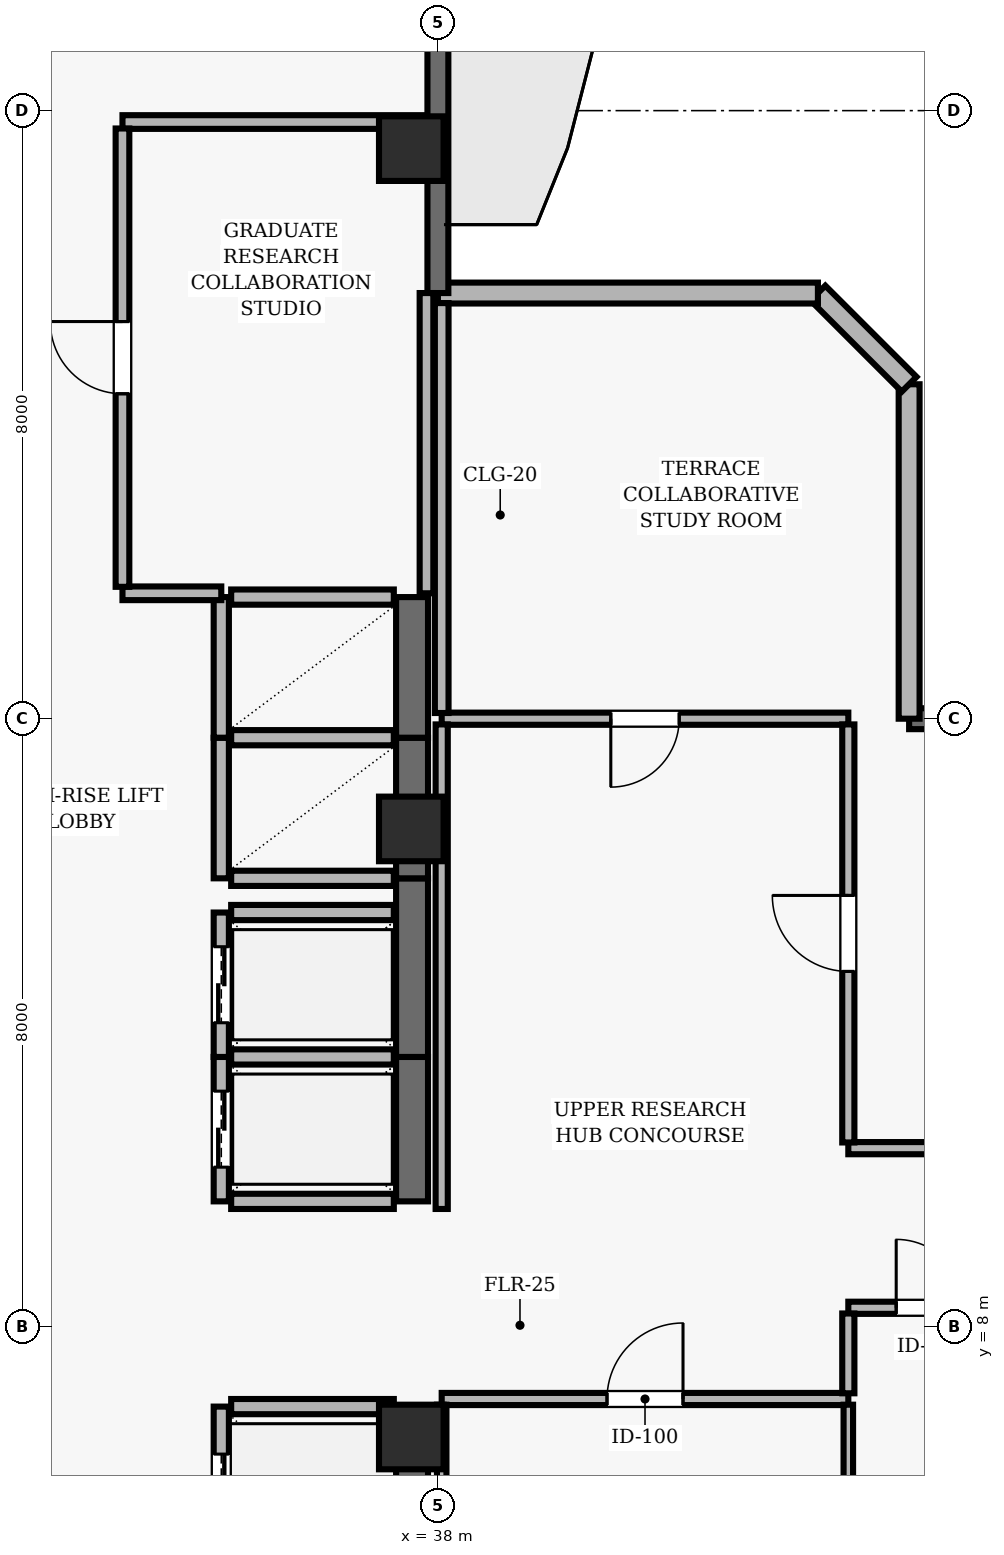
"""IFC4 building model, lengths in metres.
Left out: names, types, materials, properties, quantities, classifications, styles, units other than length and angle.
Written with IfcOpenShell. Run it as: python <this file> out.ifc"""

import sys

from ifc_helpers import new_model, si_unit, direction, frame, frame_2d, origin, origin_2d, place, context, subcontext, project, spatial, rectangle, extrude, element, fill, save


model = new_model("IFC4")
c1 = context("Model", 3, precision=1e-05, world=origin(), true_north=direction((0.0, 1.0)))
c2 = subcontext(c1, "Body", "Model", "MODEL_VIEW")
j1 = project(units=[si_unit("LENGTHUNIT", "METRE"), si_unit("PLANEANGLEUNIT", "RADIAN")], contexts=[c1])
p1 = place(None, origin())
s1 = spatial("IfcSite", under=j1, at=p1, CompositionType="ELEMENT")
p2 = place(p1, origin())
s2 = spatial("IfcBuilding", under=s1, at=p2, CompositionType="ELEMENT")
p3 = place(p2, frame((0.0, 0.0, 302.8)))
s3 = spatial("IfcBuildingStorey", under=s2, at=p3, CompositionType="ELEMENT", Elevation=302.8)
for number, where, z_axis, x_axis in (
    (1, (37.65, 6.55, 0.0), (0.0, 0.0, 1.0), (1.0, 0.0, 0.0)),
    (2, (37.65, 14.55, 0.0), (0.0, 0.0, 1.0), (1.0, 0.0, 0.0)),
    (3, (37.65, 23.5, 0.0), (0.0, 0.0, 1.0), (1.0, 0.0, 0.0)),
):
    element("IfcColumn", number, at=place(p3, frame(where, z_axis=z_axis, x_axis=x_axis)), inside=s3, PredefinedType="COLUMN", context=c2, shape_type="SweptSolid", body=[
        extrude(rectangle(XDim=0.85, YDim=0.85, at=origin_2d()), origin(), (0.0, 0.0, 1.0), 3.9),
    ])
p4 = place(p3, frame((57.3, 16.0, 0.0), z_axis=(0.0, 0.0, 1.0), x_axis=(-1.0, 0.0, 0.0)))
e4 = element("IfcWall", 4, at=p4, inside=s3, PredefinedType="SOLIDWALL", context=c2, shape_type="SweptSolid", body=[
    extrude(rectangle(XDim=13.1, YDim=0.275, at=frame_2d((6.55, 0.0))), origin(), (0.0, 0.0, 1.0), 3.64),
])
p5 = place(p4, frame((7.05, 0.0, 0.0)))
e5 = element("IfcOpeningElement", 5, at=p5, cuts=e4, PredefinedType="OPENING", context=c2, shape_type="SweptSolid", body=[
    extrude(rectangle(XDim=1.0, YDim=2.2, at=frame_2d((0.5, 1.1))), frame((0.0, 0.147, 0.0), z_axis=(0.0, -1.0, 0.0), x_axis=(1.0, 0.0, 0.0)), (0.0, 0.0, 1.0), 0.295),
])
p6 = place(p4, frame((2.375, 0.0, 0.9)))
e6 = element("IfcOpeningElement", 6, at=p6, cuts=e4, PredefinedType="OPENING", context=c2, shape_type="SweptSolid", body=[
    extrude(rectangle(XDim=1.8, YDim=1.8, at=frame_2d((0.9, 0.9))), frame((0.0, 0.147, 0.0), z_axis=(0.0, -1.0, 0.0), x_axis=(1.0, 0.0, 0.0)), (0.0, 0.0, 1.0), 0.295),
])
p7 = place(p3, frame((44.2, 16.0, 0.0), z_axis=(0.0, 0.0, 1.0), x_axis=(0.0, 1.0, 0.0)))
e7 = element("IfcWall", 7, at=p7, inside=s3, PredefinedType="SOLIDWALL", context=c2, shape_type="SweptSolid", body=[
    extrude(rectangle(XDim=4.4, YDim=0.275, at=frame_2d((2.2, 0.0))), origin(), (0.0, 0.0, 1.0), 3.64),
])
p8 = place(p3, frame((44.2, 20.4, 0.0), z_axis=(0.0, 0.0, 1.0), x_axis=(-0.707034851297, 0.707178703759, 0.0)))
e8 = element("IfcWall", 8, at=p8, inside=s3, PredefinedType="SOLIDWALL", context=c2, shape_type="SweptSolid", body=[
    extrude(rectangle(XDim=1.697, YDim=0.275, at=frame_2d((0.849, 0.0))), origin(), (0.0, 0.0, 1.0), 3.64),
])
p9 = place(p3, frame((43.0, 21.6, 0.0), z_axis=(0.0, 0.0, 1.0), x_axis=(-1.0, 0.0, 0.0)))
e9 = element("IfcWall", 9, at=p9, inside=s3, PredefinedType="SOLIDWALL", context=c2, shape_type="SweptSolid", body=[
    extrude(rectangle(XDim=5.0, YDim=0.275, at=frame_2d((2.5, 0.0))), origin(), (0.0, 0.0, 1.0), 3.64),
])
p10 = place(p3, frame((38.0, 21.6, 0.0), z_axis=(0.0, 0.0, 1.0), x_axis=(0.0, 1.0, 0.0)))
e10 = element("IfcWall", 10, at=p10, inside=s3, PredefinedType="SOLIDWALL", context=c2, shape_type="SweptSolid", body=[
    extrude(rectangle(XDim=13.7, YDim=0.275, at=frame_2d((6.85, 0.0))), origin(), (0.0, 0.0, 1.0), 3.64),
])
p11 = place(p10, frame((5.35, 0.0, 0.0)))
e11 = element("IfcOpeningElement", 11, at=p11, cuts=e10, PredefinedType="OPENING", context=c2, shape_type="SweptSolid", body=[
    extrude(rectangle(XDim=1.0, YDim=2.2, at=frame_2d((0.5, 1.1))), frame((0.0, 0.147, 0.0), z_axis=(0.0, -1.0, 0.0), x_axis=(1.0, 0.0, 0.0)), (0.0, 0.0, 1.0), 0.295),
])
p12 = place(p10, frame((9.075, 0.0, 0.9)))
e12 = element("IfcOpeningElement", 12, at=p12, cuts=e10, PredefinedType="OPENING", context=c2, shape_type="SweptSolid", body=[
    extrude(rectangle(XDim=2.4, YDim=2.2, at=frame_2d((1.2, 1.1))), frame((0.0, 0.147, 0.0), z_axis=(0.0, -1.0, 0.0), x_axis=(1.0, 0.0, 0.0)), (0.0, 0.0, 1.0), 0.295),
])
p13 = place(p3, frame((35.15, 6.95, 0.0), z_axis=(0.0, 0.0, 1.0), x_axis=(0.0, -1.0, 0.0)))
e13 = element("IfcWall", 13, at=p13, inside=s3, PredefinedType="SOLIDWALL", context=c2, shape_type="SweptSolid", body=[
    extrude(rectangle(XDim=2.25, YDim=0.2, at=frame_2d((1.125, 0.0))), origin(), (0.0, 0.0, 1.0), 3.64),
])
p14 = place(p13, frame((0.625, 0.0, 0.0)))
e14 = element("IfcOpeningElement", 14, at=p14, cuts=e13, PredefinedType="OPENING", context=c2, shape_type="SweptSolid", body=[
    extrude(rectangle(XDim=1.0, YDim=2.1, at=frame_2d((0.5, 1.05))), frame((0.0, 0.11, 0.0), z_axis=(0.0, -1.0, 0.0), x_axis=(1.0, 0.0, 0.0)), (0.0, 0.0, 1.0), 0.22),
])
p15 = place(p3, frame((37.66, 4.7, 0.0), z_axis=(0.0, 0.0, 1.0), x_axis=(0.0, 1.0, 0.0)))
e15 = element("IfcWall", 15, at=p15, inside=s3, PredefinedType="SHEAR", context=c2, shape_type="SweptSolid", body=[
    extrude(rectangle(XDim=2.25, YDim=0.42, at=frame_2d((1.125, 0.0))), origin(), (0.0, 0.0, 1.0), 3.64),
])
p16 = place(p3, frame((37.42, 6.95, 0.0), z_axis=(0.0, 0.0, 1.0), x_axis=(-1.0, 0.0, 0.0)))
e16 = element("IfcWall", 16, at=p16, inside=s3, PredefinedType="SOLIDWALL", context=c2, shape_type="SweptSolid", body=[
    extrude(rectangle(XDim=2.14, YDim=0.2, at=frame_2d((1.07, 0.0))), origin(), (0.0, 0.0, 1.0), 3.64),
])
p17 = place(p3, frame((35.15, 11.55, 0.0), z_axis=(0.0, 0.0, 1.0), x_axis=(0.0, -1.0, 0.0)))
e17 = element("IfcWall", 17, at=p17, inside=s3, PredefinedType="SOLIDWALL", context=c2, shape_type="SweptSolid", body=[
    extrude(rectangle(XDim=1.9, YDim=0.2, at=frame_2d((0.95, 0.0))), origin(), (0.0, 0.0, 1.0), 3.64),
])
p18 = place(p17, frame((0.45, 0.0, 0.0)))
e18 = element("IfcOpeningElement", 18, at=p18, cuts=e17, PredefinedType="OPENING", context=c2, shape_type="SweptSolid", body=[
    extrude(rectangle(XDim=1.0, YDim=2.1, at=frame_2d((0.5, 1.05))), frame((0.0, 0.11, 0.0), z_axis=(0.0, -1.0, 0.0), x_axis=(1.0, 0.0, 0.0)), (0.0, 0.0, 1.0), 0.22),
])
p19 = place(p3, frame((37.66, 9.65, 0.0), z_axis=(0.0, 0.0, 1.0), x_axis=(0.0, 1.0, 0.0)))
e19 = element("IfcWall", 19, at=p19, inside=s3, PredefinedType="SHEAR", context=c2, shape_type="SweptSolid", body=[
    extrude(rectangle(XDim=1.9, YDim=0.42, at=frame_2d((0.95, 0.0))), origin(), (0.0, 0.0, 1.0), 3.64),
])
for number, where, z_axis, x_axis in (
    (20, (35.28, 9.65, 0.0), (0.0, 0.0, 1.0), (1.0, 0.0, 0.0)),
    (21, (37.42, 11.55, 0.0), (0.0, 0.0, 1.0), (-1.0, 0.0, 0.0)),
):
    element("IfcWall", number, at=place(p3, frame(where, z_axis=z_axis, x_axis=x_axis)), inside=s3, PredefinedType="SOLIDWALL", context=c2, shape_type="SweptSolid", body=[
        extrude(rectangle(XDim=2.14, YDim=0.2, at=frame_2d((1.07, 0.0))), origin(), (0.0, 0.0, 1.0), 3.64),
    ])
p20 = place(p3, frame((35.15, 13.45, 0.0), z_axis=(0.0, 0.0, 1.0), x_axis=(0.0, -1.0, 0.0)))
e22 = element("IfcWall", 22, at=p20, inside=s3, PredefinedType="SOLIDWALL", context=c2, shape_type="SweptSolid", body=[
    extrude(rectangle(XDim=1.9, YDim=0.2, at=frame_2d((0.95, 0.0))), origin(), (0.0, 0.0, 1.0), 3.64),
])
p21 = place(p20, frame((0.45, 0.0, 0.0)))
e23 = element("IfcOpeningElement", 23, at=p21, cuts=e22, PredefinedType="OPENING", context=c2, shape_type="SweptSolid", body=[
    extrude(rectangle(XDim=1.0, YDim=2.1, at=frame_2d((0.5, 1.05))), frame((0.0, 0.11, 0.0), z_axis=(0.0, -1.0, 0.0), x_axis=(1.0, 0.0, 0.0)), (0.0, 0.0, 1.0), 0.22),
])
p22 = place(p3, frame((37.66, 11.55, 0.0), z_axis=(0.0, 0.0, 1.0), x_axis=(0.0, 1.0, 0.0)))
e24 = element("IfcWall", 24, at=p22, inside=s3, PredefinedType="SHEAR", context=c2, shape_type="SweptSolid", body=[
    extrude(rectangle(XDim=2.35, YDim=0.42, at=frame_2d((1.175, 0.0))), origin(), (0.0, 0.0, 1.0), 3.64),
])
p23 = place(p3, frame((37.42, 13.45, 0.0), z_axis=(0.0, 0.0, 1.0), x_axis=(-1.0, 0.0, 0.0)))
e25 = element("IfcWall", 25, at=p23, inside=s3, PredefinedType="SOLIDWALL", context=c2, shape_type="SweptSolid", body=[
    extrude(rectangle(XDim=2.14, YDim=0.2, at=frame_2d((1.07, 0.0))), origin(), (0.0, 0.0, 1.0), 3.64),
])
p24 = place(p3, frame((35.15, 15.75, 0.0), z_axis=(0.0, 0.0, 1.0), x_axis=(0.0, -1.0, 0.0)))
e26 = element("IfcWall", 26, at=p24, inside=s3, PredefinedType="SOLIDWALL", context=c2, shape_type="SweptSolid", body=[
    extrude(rectangle(XDim=1.85, YDim=0.2, at=frame_2d((0.925, 0.0))), origin(), (0.0, 0.0, 1.0), 3.64),
])
p25 = place(p3, frame((37.66, 13.9, 0.0), z_axis=(0.0, 0.0, 1.0), x_axis=(0.0, 1.0, 0.0)))
e27 = element("IfcWall", 27, at=p25, inside=s3, PredefinedType="SHEAR", context=c2, shape_type="SweptSolid", body=[
    extrude(rectangle(XDim=1.85, YDim=0.42, at=frame_2d((0.925, 0.0))), origin(), (0.0, 0.0, 1.0), 3.64),
])
for number, where, z_axis, x_axis in (
    (28, (35.28, 13.9, 0.0), (0.0, 0.0, 1.0), (1.0, 0.0, 0.0)),
    (29, (37.42, 15.75, 0.0), (0.0, 0.0, 1.0), (-1.0, 0.0, 0.0)),
):
    element("IfcWall", number, at=place(p3, frame(where, z_axis=z_axis, x_axis=x_axis)), inside=s3, PredefinedType="SOLIDWALL", context=c2, shape_type="SweptSolid", body=[
        extrude(rectangle(XDim=2.14, YDim=0.2, at=frame_2d((1.07, 0.0))), origin(), (0.0, 0.0, 1.0), 3.64),
    ])
p26 = place(p3, frame((35.15, 17.6, 0.0), z_axis=(0.0, 0.0, 1.0), x_axis=(0.0, -1.0, 0.0)))
e30 = element("IfcWall", 30, at=p26, inside=s3, PredefinedType="SOLIDWALL", context=c2, shape_type="SweptSolid", body=[
    extrude(rectangle(XDim=1.85, YDim=0.2, at=frame_2d((0.925, 0.0))), origin(), (0.0, 0.0, 1.0), 3.64),
])
p27 = place(p3, frame((37.66, 15.75, 0.0), z_axis=(0.0, 0.0, 1.0), x_axis=(0.0, 1.0, 0.0)))
e31 = element("IfcWall", 31, at=p27, inside=s3, PredefinedType="SHEAR", context=c2, shape_type="SweptSolid", body=[
    extrude(rectangle(XDim=1.85, YDim=0.42, at=frame_2d((0.925, 0.0))), origin(), (0.0, 0.0, 1.0), 3.64),
])
p28 = place(p3, frame((37.42, 17.6, 0.0), z_axis=(0.0, 0.0, 1.0), x_axis=(-1.0, 0.0, 0.0)))
e32 = element("IfcWall", 32, at=p28, inside=s3, PredefinedType="SOLIDWALL", context=c2, shape_type="SweptSolid", body=[
    extrude(rectangle(XDim=2.14, YDim=0.2, at=frame_2d((1.07, 0.0))), origin(), (0.0, 0.0, 1.0), 3.64),
])
p29 = place(p3, frame((33.85, 17.65, 0.0), z_axis=(0.0, 0.0, 1.0), x_axis=(1.0, 0.0, 0.0)))
e33 = element("IfcWall", 33, at=p29, inside=s3, PredefinedType="PARTITIONING", context=c2, shape_type="SweptSolid", body=[
    extrude(rectangle(XDim=1.3, YDim=0.18, at=frame_2d((0.65, 0.0))), origin(), (0.0, 0.0, 1.0), 3.64),
])
p30 = place(p3, frame((37.85, 23.85, 0.0), z_axis=(0.0, 0.0, 1.0), x_axis=(-1.0, 0.0, 0.0)))
e34 = element("IfcWall", 34, at=p30, inside=s3, PredefinedType="PARTITIONING", context=c2, shape_type="SweptSolid", body=[
    extrude(rectangle(XDim=4.0, YDim=0.18, at=frame_2d((2.0, 0.0))), origin(), (0.0, 0.0, 1.0), 3.171),
])
p31 = place(p3, frame((38.05, 7.05, 0.0), z_axis=(0.0, 0.0, 1.0), x_axis=(1.0, 0.0, 0.0)))
e35 = element("IfcWall", 35, at=p31, inside=s3, PredefinedType="PARTITIONING", context=c2, shape_type="SweptSolid", body=[
    extrude(rectangle(XDim=5.35, YDim=0.16, at=frame_2d((2.675, 0.0))), origin(), (0.0, 0.0, 1.0), 3.64),
])
p32 = place(p31, frame((2.175, 0.0, 0.0)))
e36 = element("IfcOpeningElement", 36, at=p32, cuts=e35, PredefinedType="OPENING", context=c2, shape_type="SweptSolid", body=[
    extrude(rectangle(XDim=1.0, YDim=2.1, at=frame_2d((0.5, 1.05))), frame((0.0, 0.09, 0.0), z_axis=(0.0, -1.0, 0.0), x_axis=(1.0, 0.0, 0.0)), (0.0, 0.0, 1.0), 0.18),
])
p33 = place(p3, frame((43.4, 8.25, 0.0), z_axis=(0.0, 0.0, 1.0), x_axis=(1.0, 0.0, 0.0)))
e37 = element("IfcWall", 37, at=p33, inside=s3, PredefinedType="PARTITIONING", context=c2, shape_type="SweptSolid", body=[
    extrude(rectangle(XDim=4.26, YDim=0.16, at=frame_2d((2.13, 0.0))), origin(), (0.0, 0.0, 1.0), 3.171),
])
p34 = place(p33, frame((0.63, 0.0, 0.0)))
e38 = element("IfcOpeningElement", 38, at=p34, cuts=e37, PredefinedType="OPENING", context=c2, shape_type="SweptSolid", body=[
    extrude(rectangle(XDim=0.9, YDim=2.1, at=frame_2d((0.45, 1.05))), frame((0.0, 0.09, 0.0), z_axis=(0.0, -1.0, 0.0), x_axis=(1.0, 0.0, 0.0)), (0.0, 0.0, 1.0), 0.18),
])
p35 = place(p3, frame((43.4, 16.0, 0.0), z_axis=(0.0, 0.0, 1.0), x_axis=(-1.0, 0.0, 0.0)))
e39 = element("IfcWall", 39, at=p35, inside=s3, PredefinedType="PARTITIONING", context=c2, shape_type="SweptSolid", body=[
    extrude(rectangle(XDim=5.35, YDim=0.16, at=frame_2d((2.675, 0.0))), origin(), (0.0, 0.0, 1.0), 3.34),
])
p36 = place(p35, frame((2.225, 0.0, 0.0)))
e40 = element("IfcOpeningElement", 40, at=p36, cuts=e39, PredefinedType="OPENING", context=c2, shape_type="SweptSolid", body=[
    extrude(rectangle(XDim=0.9, YDim=2.1, at=frame_2d((0.45, 1.05))), frame((0.0, 0.09, 0.0), z_axis=(0.0, -1.0, 0.0), x_axis=(1.0, 0.0, 0.0)), (0.0, 0.0, 1.0), 0.18),
])
p37 = place(p3, frame((47.66, 10.35, 0.0), z_axis=(0.0, 0.0, 1.0), x_axis=(-1.0, 0.0, 0.0)))
e41 = element("IfcWall", 41, at=p37, inside=s3, PredefinedType="PARTITIONING", context=c2, shape_type="SweptSolid", body=[
    extrude(rectangle(XDim=4.26, YDim=0.16, at=frame_2d((2.13, 0.0))), origin(), (0.0, 0.0, 1.0), 3.322),
])
p38 = place(p3, frame((33.85, 17.735, 0.0), z_axis=(0.0, 0.0, 1.0), x_axis=(0.0, 1.0, 0.0)))
e42 = element("IfcWall", 42, at=p38, inside=s3, PredefinedType="PARTITIONING", context=c2, shape_type="SweptSolid", body=[
    extrude(rectangle(XDim=6.03, YDim=0.18, at=frame_2d((3.015, 0.0))), origin(), (0.0, 0.0, 1.0), 3.64),
])
p39 = place(p38, frame((2.54, 0.0, 0.0)))
e43 = element("IfcOpeningElement", 43, at=p39, cuts=e42, PredefinedType="OPENING", context=c2, shape_type="SweptSolid", body=[
    extrude(rectangle(XDim=0.95, YDim=2.1, at=frame_2d((0.475, 1.05))), frame((0.0, 0.1, 0.0), z_axis=(0.0, -1.0, 0.0), x_axis=(1.0, 0.0, 0.0)), (0.0, 0.0, 1.0), 0.2),
])
p40 = place(p3, frame((37.85, 17.65, 0.0), z_axis=(0.0, 0.0, 1.0), x_axis=(0.0, 1.0, 0.0)))
e44 = element("IfcWall", 44, at=p40, inside=s3, PredefinedType="PARTITIONING", context=c2, shape_type="SweptSolid", body=[
    extrude(rectangle(XDim=3.95, YDim=0.18, at=frame_2d((1.975, 0.0))), origin(), (0.0, 0.0, 1.0), 3.171),
])
p41 = place(p3, frame((38.05, 6.975, 0.0), z_axis=(0.0, 0.0, 1.0), x_axis=(0.0, -1.0, 0.0)))
e45 = element("IfcWall", 45, at=p41, inside=s3, PredefinedType="PARTITIONING", context=c2, shape_type="SweptSolid", body=[
    extrude(rectangle(XDim=6.842, YDim=0.125, at=frame_2d((3.421, 0.0))), origin(), (0.0, 0.0, 1.0), 3.171),
])
p42 = place(p3, frame((38.05, 15.925, 0.0), z_axis=(0.0, 0.0, 1.0), x_axis=(0.0, -1.0, 0.0)))
e46 = element("IfcWall", 46, at=p42, inside=s3, PredefinedType="PARTITIONING", context=c2, shape_type="SweptSolid", body=[
    extrude(rectangle(XDim=6.375, YDim=0.16, at=frame_2d((3.188, 0.0))), origin(), (0.0, 0.0, 1.0), 3.171),
])
p43 = place(p3, frame((38.05, 21.468, 0.0), z_axis=(0.0, 0.0, 1.0), x_axis=(0.0, -1.0, 0.0)))
e47 = element("IfcWall", 47, at=p43, inside=s3, PredefinedType="PARTITIONING", context=c2, shape_type="SweptSolid", body=[
    extrude(rectangle(XDim=5.393, YDim=0.18, at=frame_2d((2.697, 0.0))), origin(), (0.0, 0.0, 1.0), 3.171),
])
p44 = place(p3, frame((43.4, 0.133, 0.0), z_axis=(0.0, 0.0, 1.0), x_axis=(0.0, 1.0, 0.0)))
e48 = element("IfcWall", 48, at=p44, inside=s3, PredefinedType="PARTITIONING", context=c2, shape_type="SweptSolid", body=[
    extrude(rectangle(XDim=6.842, YDim=0.125, at=frame_2d((3.421, 0.0))), origin(), (0.0, 0.0, 1.0), 3.64),
])
p45 = place(p3, frame((43.4, 7.125, 0.0), z_axis=(0.0, 0.0, 1.0), x_axis=(0.0, 1.0, 0.0)))
e49 = element("IfcWall", 49, at=p45, inside=s3, PredefinedType="PARTITIONING", context=c2, shape_type="SweptSolid", body=[
    extrude(rectangle(XDim=1.05, YDim=0.16, at=frame_2d((0.525, 0.0))), origin(), (0.0, 0.0, 1.0), 3.64),
])
p46 = place(p3, frame((43.4, 10.425, 0.0), z_axis=(0.0, 0.0, 1.0), x_axis=(0.0, 1.0, 0.0)))
e50 = element("IfcWall", 50, at=p46, inside=s3, PredefinedType="PARTITIONING", context=c2, shape_type="SweptSolid", body=[
    extrude(rectangle(XDim=5.5, YDim=0.16, at=frame_2d((2.75, 0.0))), origin(), (0.0, 0.0, 1.0), 3.64),
])
p47 = place(p46, frame((2.25, 0.0, 0.0)))
e51 = element("IfcOpeningElement", 51, at=p47, cuts=e50, PredefinedType="OPENING", context=c2, shape_type="SweptSolid", body=[
    extrude(rectangle(XDim=1.0, YDim=2.1, at=frame_2d((0.5, 1.05))), frame((0.0, 0.09, 0.0), z_axis=(0.0, -1.0, 0.0), x_axis=(1.0, 0.0, 0.0)), (0.0, 0.0, 1.0), 0.18),
])
p48 = place(p14, origin())
e52 = element("IfcDoor", 52, at=p48, inside=s3, OperationType="DOUBLE_DOOR_SLIDING", PredefinedType="DOOR", context=c2, shape_type="SweptSolid", body=[
    extrude(rectangle(XDim=1.0, YDim=2.1, at=frame_2d((0.5, 1.05))), frame((0.0, 0.025, 0.0), z_axis=(0.0, -1.0, 0.0), x_axis=(1.0, 0.0, 0.0)), (0.0, 0.0, 1.0), 0.05),
])
fill(e14, e52)
p49 = place(p18, origin())
e53 = element("IfcDoor", 53, at=p49, inside=s3, OperationType="DOUBLE_DOOR_SLIDING", PredefinedType="DOOR", context=c2, shape_type="SweptSolid", body=[
    extrude(rectangle(XDim=1.0, YDim=2.1, at=frame_2d((0.5, 1.05))), frame((0.0, 0.025, 0.0), z_axis=(0.0, -1.0, 0.0), x_axis=(1.0, 0.0, 0.0)), (0.0, 0.0, 1.0), 0.05),
])
fill(e18, e53)
p50 = place(p21, origin())
e54 = element("IfcDoor", 54, at=p50, inside=s3, OperationType="DOUBLE_DOOR_SLIDING", PredefinedType="DOOR", context=c2, shape_type="SweptSolid", body=[
    extrude(rectangle(XDim=1.0, YDim=2.1, at=frame_2d((0.5, 1.05))), frame((0.0, 0.025, 0.0), z_axis=(0.0, -1.0, 0.0), x_axis=(1.0, 0.0, 0.0)), (0.0, 0.0, 1.0), 0.05),
])
fill(e23, e54)
p51 = place(p39, origin())
e55 = element("IfcDoor", 55, at=p51, inside=s3, OperationType="SINGLE_SWING_RIGHT", PredefinedType="DOOR", context=c2, shape_type="SweptSolid", body=[
    extrude(rectangle(XDim=0.95, YDim=2.1, at=frame_2d((0.475, 1.05))), frame((0.0, 0.025, 0.0), z_axis=(0.0, -1.0, 0.0), x_axis=(1.0, 0.0, 0.0)), (0.0, 0.0, 1.0), 0.05),
])
fill(e43, e55)
p52 = place(p32, origin())
e56 = element("IfcDoor", 56, at=p52, inside=s3, OperationType="SINGLE_SWING_RIGHT", PredefinedType="DOOR", context=c2, shape_type="SweptSolid", body=[
    extrude(rectangle(XDim=1.0, YDim=2.1, at=frame_2d((0.5, 1.05))), frame((0.0, 0.025, 0.0), z_axis=(0.0, -1.0, 0.0), x_axis=(1.0, 0.0, 0.0)), (0.0, 0.0, 1.0), 0.05),
])
fill(e36, e56)
p53 = place(p34, origin())
e57 = element("IfcDoor", 57, at=p53, inside=s3, OperationType="SINGLE_SWING_LEFT", PredefinedType="DOOR", context=c2, shape_type="SweptSolid", body=[
    extrude(rectangle(XDim=0.9, YDim=2.1, at=frame_2d((0.45, 1.05))), frame((0.0, 0.025, 0.0), z_axis=(0.0, -1.0, 0.0), x_axis=(1.0, 0.0, 0.0)), (0.0, 0.0, 1.0), 0.05),
])
fill(e38, e57)
p54 = place(p47, origin())
e58 = element("IfcDoor", 58, at=p54, inside=s3, OperationType="SINGLE_SWING_RIGHT", PredefinedType="DOOR", context=c2, shape_type="SweptSolid", body=[
    extrude(rectangle(XDim=1.0, YDim=2.1, at=frame_2d((0.5, 1.05))), frame((0.0, 0.025, 0.0), z_axis=(0.0, -1.0, 0.0), x_axis=(1.0, 0.0, 0.0)), (0.0, 0.0, 1.0), 0.05),
])
fill(e51, e58)
p55 = place(p36, origin())
e59 = element("IfcDoor", 59, at=p55, inside=s3, OperationType="SINGLE_SWING_RIGHT", PredefinedType="DOOR", context=c2, shape_type="SweptSolid", body=[
    extrude(rectangle(XDim=0.9, YDim=2.1, at=frame_2d((0.45, 1.05))), frame((0.0, 0.025, 0.0), z_axis=(0.0, -1.0, 0.0), x_axis=(1.0, 0.0, 0.0)), (0.0, 0.0, 1.0), 0.05),
])
fill(e40, e59)
save(model, sys.argv[1])
